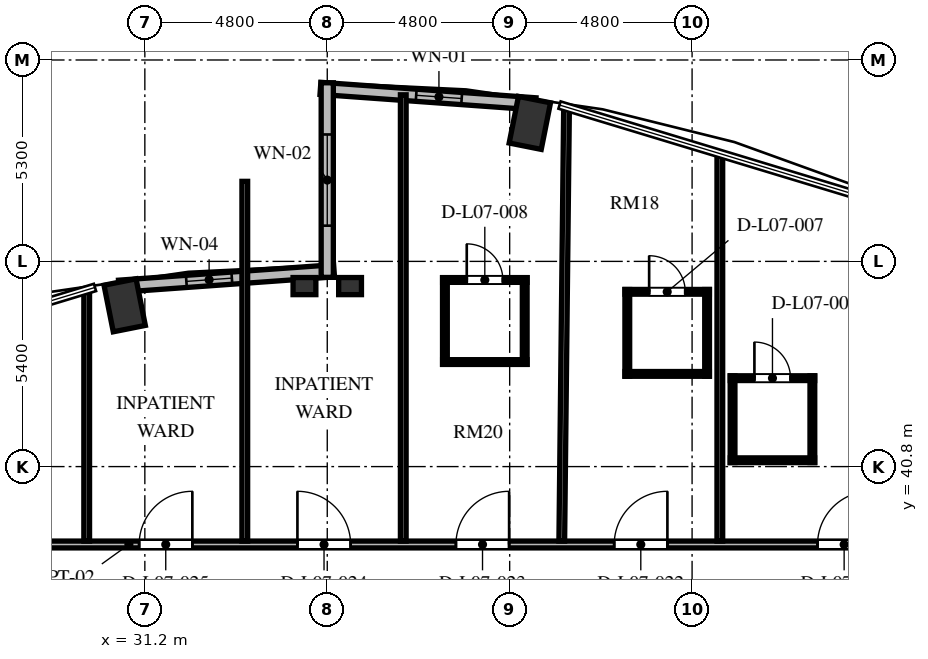
"""IFC4 building model, lengths in metres.
Left out: names, types, materials, properties, quantities, classifications, styles, units other than length and angle.
Written with IfcOpenShell. Run it as: python <this file> out.ifc"""

import sys

from ifc_helpers import new_model, si_unit, direction, frame, frame_2d, origin, origin_2d, place, context, subcontext, project, spatial, rectangle, extrude, element, fill, save


model = new_model("IFC4")
c1 = context("Model", 3, precision=1e-05, world=origin(), true_north=direction((0.0, 1.0)))
c2 = subcontext(c1, "Body", "Model", "MODEL_VIEW")
j1 = project(units=[si_unit("LENGTHUNIT", "METRE"), si_unit("PLANEANGLEUNIT", "RADIAN")], contexts=[c1])
p1 = place(None, origin())
s1 = spatial("IfcSite", under=j1, at=p1, CompositionType="ELEMENT")
p2 = place(p1, origin())
s2 = spatial("IfcBuilding", under=s1, at=p2, CompositionType="ELEMENT")
p3 = place(p2, frame((0.0, 0.0, 32.496)))
s3 = spatial("IfcBuildingStorey", under=s2, at=p3, CompositionType="ELEMENT", Elevation=32.496)
for number, where, z_axis, x_axis in (
    (1, (41.331, 49.844, 0.0), (0.0, 0.0, 1.0), (0.195, 0.981, 0.0)),
    (2, (30.669, 45.044, 0.0), (0.0, 0.0, 1.0), (-0.195, 0.981, 0.0)),
):
    element("IfcColumn", number, at=place(p3, frame(where, z_axis=z_axis, x_axis=x_axis)), inside=s3, PredefinedType="COLUMN", context=c2, shape_type="SweptSolid", body=[
        extrude(rectangle(XDim=1.25, YDim=0.86, at=origin_2d()), origin(), (0.0, 0.0, 1.0), 3.648),
    ])
for number, where, z_axis, x_axis in (
    (3, (35.4, 45.55, 0.0), (0.0, 0.0, 1.0), (1.0, 0.0, 0.0)),
    (4, (36.6, 45.55, 0.0), (0.0, 0.0, 1.0), (1.0, 0.0, 0.0)),
):
    element("IfcColumn", number, at=place(p3, frame(where, z_axis=z_axis, x_axis=x_axis)), inside=s3, PredefinedType="PILASTER", context=c2, shape_type="SweptSolid", body=[
        extrude(rectangle(XDim=0.6, YDim=0.45, at=origin_2d()), origin(), (0.0, 0.0, 1.0), 3.648),
    ])
p4 = place(p3, frame((41.481, 50.346, 0.0), z_axis=(0.0, 0.0, 1.0), x_axis=(-0.997422321809, 0.071754525696, 0.0)))
e5 = element("IfcWall", 5, at=p4, inside=s3, PredefinedType="SOLIDWALL", context=c2, shape_type="SweptSolid", body=[
    extrude(rectangle(XDim=5.675, YDim=0.32, at=frame_2d((2.838, 0.0))), origin(), (0.0, 0.0, 1.0), 3.428),
])
p5 = place(p4, frame((1.949, 0.0, 0.85)))
e6 = element("IfcOpeningElement", 6, at=p5, cuts=e5, PredefinedType="OPENING", context=c2, shape_type="SweptSolid", body=[
    extrude(rectangle(XDim=1.2, YDim=2.2, at=frame_2d((0.6, 1.1))), frame((0.0, 0.17, 0.0), z_axis=(0.0, -1.0, 0.0), x_axis=(1.0, 0.0, 0.0)), (0.0, 0.0, 1.0), 0.34),
])
p6 = place(p3, frame((36.179, 45.953, 0.0), z_axis=(0.0, 0.0, 1.0), x_axis=(-0.997421878774, -0.071760683825, 0.0)))
e7 = element("IfcWall", 7, at=p6, inside=s3, PredefinedType="SOLIDWALL", context=c2, shape_type="SweptSolid", body=[
    extrude(rectangle(XDim=5.675, YDim=0.32, at=frame_2d((2.837, 0.0))), origin(), (0.0, 0.0, 1.0), 3.428),
])
p7 = place(p6, frame((2.696, 0.0, 0.85)))
e8 = element("IfcOpeningElement", 8, at=p7, cuts=e7, PredefinedType="OPENING", context=c2, shape_type="SweptSolid", body=[
    extrude(rectangle(XDim=1.2, YDim=1.8, at=frame_2d((0.6, 0.9))), frame((0.0, 0.17, 0.0), z_axis=(0.0, -1.0, 0.0), x_axis=(1.0, 0.0, 0.0)), (0.0, 0.0, 1.0), 0.34),
])
p8 = place(p3, frame((36.0, 50.9, 0.0), z_axis=(0.0, 0.0, 1.0), x_axis=(0.0, -1.0, 0.0)))
e9 = element("IfcWall", 9, at=p8, inside=s3, PredefinedType="SOLIDWALL", context=c2, shape_type="SweptSolid", body=[
    extrude(rectangle(XDim=5.12, YDim=0.32, at=frame_2d((2.56, 0.0))), origin(), (0.0, 0.0, 1.0), 3.428),
])
p9 = place(p8, frame((1.36, 0.0, 0.84)))
e10 = element("IfcOpeningElement", 10, at=p9, cuts=e9, PredefinedType="OPENING", context=c2, shape_type="SweptSolid", body=[
    extrude(rectangle(XDim=2.4, YDim=2.04, at=frame_2d((1.2, 1.02))), frame((0.0, 0.17, 0.0), z_axis=(0.0, -1.0, 0.0), x_axis=(1.0, 0.0, 0.0)), (0.0, 0.0, 1.0), 0.34),
])
p10 = place(p3, frame((23.31, 38.75, 0.0), z_axis=(0.0, 0.0, 1.0), x_axis=(1.0, 0.0, 0.0)))
e11 = element("IfcWall", 11, at=p10, inside=s3, PredefinedType="PARTITIONING", context=c2, shape_type="SweptSolid", body=[
    extrude(rectangle(XDim=29.88, YDim=0.18, at=frame_2d((14.94, 0.0))), origin(), (0.0, 0.0, 1.0), 3.053),
])
p11 = place(p10, frame((25.591, 0.0, 0.0)))
e12 = element("IfcOpeningElement", 12, at=p11, cuts=e11, PredefinedType="OPENING", context=c2, shape_type="SweptSolid", body=[
    extrude(rectangle(XDim=1.4, YDim=2.2, at=frame_2d((0.7, 1.1))), frame((0.0, 0.1, 0.0), z_axis=(0.0, -1.0, 0.0), x_axis=(1.0, 0.0, 0.0)), (0.0, 0.0, 1.0), 0.2),
])
p12 = place(p10, frame((20.24, 0.0, 0.0)))
e13 = element("IfcOpeningElement", 13, at=p12, cuts=e11, PredefinedType="OPENING", context=c2, shape_type="SweptSolid", body=[
    extrude(rectangle(XDim=1.4, YDim=2.2, at=frame_2d((0.7, 1.1))), frame((0.0, 0.1, 0.0), z_axis=(0.0, -1.0, 0.0), x_axis=(1.0, 0.0, 0.0)), (0.0, 0.0, 1.0), 0.2),
])
p13 = place(p10, frame((16.075, 0.0, 0.0)))
e14 = element("IfcOpeningElement", 14, at=p13, cuts=e11, PredefinedType="OPENING", context=c2, shape_type="SweptSolid", body=[
    extrude(rectangle(XDim=1.4, YDim=2.2, at=frame_2d((0.7, 1.1))), frame((0.0, 0.1, 0.0), z_axis=(0.0, -1.0, 0.0), x_axis=(1.0, 0.0, 0.0)), (0.0, 0.0, 1.0), 0.2),
])
p14 = place(p10, frame((11.905, 0.0, 0.0)))
e15 = element("IfcOpeningElement", 15, at=p14, cuts=e11, PredefinedType="OPENING", context=c2, shape_type="SweptSolid", body=[
    extrude(rectangle(XDim=1.4, YDim=2.2, at=frame_2d((0.7, 1.1))), frame((0.0, 0.1, 0.0), z_axis=(0.0, -1.0, 0.0), x_axis=(1.0, 0.0, 0.0)), (0.0, 0.0, 1.0), 0.2),
])
p15 = place(p10, frame((7.74, 0.0, 0.0)))
e16 = element("IfcOpeningElement", 16, at=p15, cuts=e11, PredefinedType="OPENING", context=c2, shape_type="SweptSolid", body=[
    extrude(rectangle(XDim=1.4, YDim=2.2, at=frame_2d((0.7, 1.1))), frame((0.0, 0.1, 0.0), z_axis=(0.0, -1.0, 0.0), x_axis=(1.0, 0.0, 0.0)), (0.0, 0.0, 1.0), 0.2),
])
p16 = place(p10, frame((2.639, 0.0, 0.0)))
e17 = element("IfcOpeningElement", 17, at=p16, cuts=e11, PredefinedType="OPENING", context=c2, shape_type="SweptSolid", body=[
    extrude(rectangle(XDim=1.4, YDim=2.2, at=frame_2d((0.7, 1.1))), frame((0.0, 0.1, 0.0), z_axis=(0.0, -1.0, 0.0), x_axis=(1.0, 0.0, 0.0)), (0.0, 0.0, 1.0), 0.2),
])
p17 = place(p3, frame((29.67, 38.84, 0.0), z_axis=(0.0, 0.0, 1.0), x_axis=(0.0, 1.0, 0.0)))
e18 = element("IfcWall", 18, at=p17, inside=s3, PredefinedType="PARTITIONING", context=c2, shape_type="SweptSolid", body=[
    extrude(rectangle(XDim=6.596, YDim=0.15, at=frame_2d((3.298, 0.0))), origin(), (0.0, 0.0, 1.0), 3.428),
])
p18 = place(p3, frame((33.83, 38.84, 0.0), z_axis=(0.0, 0.0, 1.0), x_axis=(0.0, 1.0, 0.0)))
e19 = element("IfcWall", 19, at=p18, inside=s3, PredefinedType="PARTITIONING", context=c2, shape_type="SweptSolid", body=[
    extrude(rectangle(XDim=9.466, YDim=0.15, at=frame_2d((4.733, 0.0))), origin(), (0.0, 0.0, 1.0), 3.428),
])
p19 = place(p3, frame((38.0, 38.84, 0.0), z_axis=(0.0, 0.0, 1.0), x_axis=(0.0, 1.0, 0.0)))
e20 = element("IfcWall", 20, at=p19, inside=s3, PredefinedType="PARTITIONING", context=c2, shape_type="SweptSolid", body=[
    extrude(rectangle(XDim=11.743, YDim=0.15, at=frame_2d((5.872, 0.0))), origin(), (0.0, 0.0, 1.0), 3.428),
])
p20 = place(p3, frame((42.171, 38.84, 0.0), z_axis=(0.0, 0.0, 1.0), x_axis=(0.010986468696, 0.999939646932, 0.0)))
e21 = element("IfcWall", 21, at=p20, inside=s3, PredefinedType="PARTITIONING", context=c2, shape_type="SweptSolid", body=[
    extrude(rectangle(XDim=11.422, YDim=0.15, at=frame_2d((5.711, 0.0))), origin(), (0.0, 0.0, 1.0), 3.428),
])
p21 = place(p3, frame((46.33, 38.84, 0.0), z_axis=(0.0, 0.0, 1.0), x_axis=(0.0, 1.0, 0.0)))
e22 = element("IfcWall", 22, at=p21, inside=s3, PredefinedType="PARTITIONING", context=c2, shape_type="SweptSolid", body=[
    extrude(rectangle(XDim=10.185, YDim=0.15, at=frame_2d((5.092, 0.0))), origin(), (0.0, 0.0, 1.0), 3.428),
])
p22 = place(p3, frame((46.605, 43.127, 0.0), z_axis=(0.0, 0.0, 1.0), x_axis=(1.0, 0.0, 0.0)))
e23 = element("IfcWall", 23, at=p22, inside=s3, PredefinedType="PARTITIONING", context=c2, shape_type="SweptSolid", body=[
    extrude(rectangle(XDim=2.22, YDim=0.125, at=frame_2d((1.11, 0.0))), origin(), (0.0, 0.0, 1.0), 3.428),
])
p23 = place(p22, frame((0.635, 0.0, 0.0)))
e24 = element("IfcOpeningElement", 24, at=p23, cuts=e23, PredefinedType="OPENING", context=c2, shape_type="SweptSolid", body=[
    extrude(rectangle(XDim=0.95, YDim=2.1, at=frame_2d((0.475, 1.05))), frame((0.0, 0.073, 0.0), z_axis=(0.0, -1.0, 0.0), x_axis=(1.0, 0.0, 0.0)), (0.0, 0.0, 1.0), 0.145),
])
p24 = place(p3, frame((46.605, 40.967, 0.0), z_axis=(0.0, 0.0, 1.0), x_axis=(1.0, 0.0, 0.0)))
e25 = element("IfcWall", 25, at=p24, inside=s3, PredefinedType="PARTITIONING", context=c2, shape_type="SweptSolid", body=[
    extrude(rectangle(XDim=2.22, YDim=0.125, at=frame_2d((1.11, 0.0))), origin(), (0.0, 0.0, 1.0), 3.428),
])
for number, where, z_axis, x_axis in (
    (26, (48.765, 40.907, 0.0), (0.0, 0.0, 1.0), (0.0, 1.0, 0.0)),
    (27, (46.665, 40.907, 0.0), (0.0, 0.0, 1.0), (0.0, 1.0, 0.0)),
):
    element("IfcWall", number, at=place(p3, frame(where, z_axis=z_axis, x_axis=x_axis)), inside=s3, PredefinedType="PARTITIONING", context=c2, shape_type="SweptSolid", body=[
        extrude(rectangle(XDim=2.28, YDim=0.125, at=frame_2d((1.14, 0.0))), origin(), (0.0, 0.0, 1.0), 3.428),
    ])
p25 = place(p3, frame((43.835, 45.399, 0.0), z_axis=(0.0, 0.0, 1.0), x_axis=(1.0, 0.0, 0.0)))
e28 = element("IfcWall", 28, at=p25, inside=s3, PredefinedType="PARTITIONING", context=c2, shape_type="SweptSolid", body=[
    extrude(rectangle(XDim=2.22, YDim=0.125, at=frame_2d((1.11, 0.0))), origin(), (0.0, 0.0, 1.0), 3.013),
])
p26 = place(p25, frame((0.635, 0.0, 0.0)))
e29 = element("IfcOpeningElement", 29, at=p26, cuts=e28, PredefinedType="OPENING", context=c2, shape_type="SweptSolid", body=[
    extrude(rectangle(XDim=0.95, YDim=2.1, at=frame_2d((0.475, 1.05))), frame((0.0, 0.073, 0.0), z_axis=(0.0, -1.0, 0.0), x_axis=(1.0, 0.0, 0.0)), (0.0, 0.0, 1.0), 0.145),
])
p27 = place(p3, frame((43.835, 43.239, 0.0), z_axis=(0.0, 0.0, 1.0), x_axis=(1.0, 0.0, 0.0)))
e30 = element("IfcWall", 30, at=p27, inside=s3, PredefinedType="PARTITIONING", context=c2, shape_type="SweptSolid", body=[
    extrude(rectangle(XDim=2.22, YDim=0.125, at=frame_2d((1.11, 0.0))), origin(), (0.0, 0.0, 1.0), 3.053),
])
for number, where, z_axis, x_axis in (
    (31, (45.995, 43.179, 0.0), (0.0, 0.0, 1.0), (0.0, 1.0, 0.0)),
    (32, (43.895, 43.179, 0.0), (0.0, 0.0, 1.0), (0.0, 1.0, 0.0)),
):
    element("IfcWall", number, at=place(p3, frame(where, z_axis=z_axis, x_axis=x_axis)), inside=s3, PredefinedType="PARTITIONING", context=c2, shape_type="SweptSolid", body=[
        extrude(rectangle(XDim=2.28, YDim=0.125, at=frame_2d((1.14, 0.0))), origin(), (0.0, 0.0, 1.0), 3.428),
    ])
p28 = place(p3, frame((39.036, 45.711, 0.0), z_axis=(0.0, 0.0, 1.0), x_axis=(1.0, 0.0, 0.0)))
e33 = element("IfcWall", 33, at=p28, inside=s3, PredefinedType="PARTITIONING", context=c2, shape_type="SweptSolid", body=[
    extrude(rectangle(XDim=2.22, YDim=0.125, at=frame_2d((1.11, 0.0))), origin(), (0.0, 0.0, 1.0), 3.428),
])
p29 = place(p28, frame((0.635, 0.0, 0.0)))
e34 = element("IfcOpeningElement", 34, at=p29, cuts=e33, PredefinedType="OPENING", context=c2, shape_type="SweptSolid", body=[
    extrude(rectangle(XDim=0.95, YDim=2.1, at=frame_2d((0.475, 1.05))), frame((0.0, 0.073, 0.0), z_axis=(0.0, -1.0, 0.0), x_axis=(1.0, 0.0, 0.0)), (0.0, 0.0, 1.0), 0.145),
])
p30 = place(p3, frame((39.036, 43.551, 0.0), z_axis=(0.0, 0.0, 1.0), x_axis=(1.0, 0.0, 0.0)))
e35 = element("IfcWall", 35, at=p30, inside=s3, PredefinedType="PARTITIONING", context=c2, shape_type="SweptSolid", body=[
    extrude(rectangle(XDim=2.22, YDim=0.125, at=frame_2d((1.11, 0.0))), origin(), (0.0, 0.0, 1.0), 3.428),
])
for number, where, z_axis, x_axis in (
    (36, (41.196, 43.491, 0.0), (0.0, 0.0, 1.0), (0.0, 1.0, 0.0)),
    (37, (39.096, 43.491, 0.0), (0.0, 0.0, 1.0), (0.0, 1.0, 0.0)),
):
    element("IfcWall", number, at=place(p3, frame(where, z_axis=z_axis, x_axis=x_axis)), inside=s3, PredefinedType="PARTITIONING", context=c2, shape_type="SweptSolid", body=[
        extrude(rectangle(XDim=2.28, YDim=0.125, at=frame_2d((1.14, 0.0))), origin(), (0.0, 0.0, 1.0), 3.428),
    ])
p31 = place(p5, origin())
e38 = element("IfcWindow", 38, at=p31, inside=s3, PartitioningType="SINGLE_PANEL", PredefinedType="WINDOW", context=c2, shape_type="SweptSolid", body=[
    extrude(rectangle(XDim=1.2, YDim=2.2, at=frame_2d((0.6, 1.1))), frame((0.0, 0.03, 0.0), z_axis=(0.0, -1.0, 0.0), x_axis=(1.0, 0.0, 0.0)), (0.0, 0.0, 1.0), 0.06),
])
fill(e6, e38)
p32 = place(p7, origin())
e39 = element("IfcWindow", 39, at=p32, inside=s3, PartitioningType="SINGLE_PANEL", PredefinedType="WINDOW", context=c2, shape_type="SweptSolid", body=[
    extrude(rectangle(XDim=1.2, YDim=1.8, at=frame_2d((0.6, 0.9))), frame((0.0, 0.03, 0.0), z_axis=(0.0, -1.0, 0.0), x_axis=(1.0, 0.0, 0.0)), (0.0, 0.0, 1.0), 0.06),
])
fill(e8, e39)
p33 = place(p9, origin())
e40 = element("IfcWindow", 40, at=p33, inside=s3, PartitioningType="SINGLE_PANEL", PredefinedType="WINDOW", context=c2, shape_type="SweptSolid", body=[
    extrude(rectangle(XDim=2.4, YDim=2.04, at=frame_2d((1.2, 1.02))), frame((0.0, 0.03, 0.0), z_axis=(0.0, -1.0, 0.0), x_axis=(1.0, 0.0, 0.0)), (0.0, 0.0, 1.0), 0.06),
])
fill(e10, e40)
p34 = place(p23, origin())
e41 = element("IfcDoor", 41, at=p34, inside=s3, OperationType="SINGLE_SWING_LEFT", PredefinedType="DOOR", context=c2, shape_type="SweptSolid", body=[
    extrude(rectangle(XDim=0.95, YDim=2.1, at=frame_2d((0.475, 1.05))), frame((0.0, 0.025, 0.0), z_axis=(0.0, -1.0, 0.0), x_axis=(1.0, 0.0, 0.0)), (0.0, 0.0, 1.0), 0.05),
])
fill(e24, e41)
p35 = place(p11, origin())
e42 = element("IfcDoor", 42, at=p35, inside=s3, OperationType="SINGLE_SWING_RIGHT", PredefinedType="DOOR", context=c2, shape_type="SweptSolid", body=[
    extrude(rectangle(XDim=1.4, YDim=2.2, at=frame_2d((0.7, 1.1))), frame((0.0, 0.025, 0.0), z_axis=(0.0, -1.0, 0.0), x_axis=(1.0, 0.0, 0.0)), (0.0, 0.0, 1.0), 0.05),
])
fill(e12, e42)
p36 = place(p26, origin())
e43 = element("IfcDoor", 43, at=p36, inside=s3, OperationType="SINGLE_SWING_LEFT", PredefinedType="DOOR", context=c2, shape_type="SweptSolid", body=[
    extrude(rectangle(XDim=0.95, YDim=2.1, at=frame_2d((0.475, 1.05))), frame((0.0, 0.025, 0.0), z_axis=(0.0, -1.0, 0.0), x_axis=(1.0, 0.0, 0.0)), (0.0, 0.0, 1.0), 0.05),
])
fill(e29, e43)
p37 = place(p12, origin())
e44 = element("IfcDoor", 44, at=p37, inside=s3, OperationType="SINGLE_SWING_RIGHT", PredefinedType="DOOR", context=c2, shape_type="SweptSolid", body=[
    extrude(rectangle(XDim=1.4, YDim=2.2, at=frame_2d((0.7, 1.1))), frame((0.0, 0.025, 0.0), z_axis=(0.0, -1.0, 0.0), x_axis=(1.0, 0.0, 0.0)), (0.0, 0.0, 1.0), 0.05),
])
fill(e13, e44)
p38 = place(p29, origin())
e45 = element("IfcDoor", 45, at=p38, inside=s3, OperationType="SINGLE_SWING_LEFT", PredefinedType="DOOR", context=c2, shape_type="SweptSolid", body=[
    extrude(rectangle(XDim=0.95, YDim=2.1, at=frame_2d((0.475, 1.05))), frame((0.0, 0.025, 0.0), z_axis=(0.0, -1.0, 0.0), x_axis=(1.0, 0.0, 0.0)), (0.0, 0.0, 1.0), 0.05),
])
fill(e34, e45)
p39 = place(p13, origin())
e46 = element("IfcDoor", 46, at=p39, inside=s3, OperationType="SINGLE_SWING_RIGHT", PredefinedType="DOOR", context=c2, shape_type="SweptSolid", body=[
    extrude(rectangle(XDim=1.4, YDim=2.2, at=frame_2d((0.7, 1.1))), frame((0.0, 0.025, 0.0), z_axis=(0.0, -1.0, 0.0), x_axis=(1.0, 0.0, 0.0)), (0.0, 0.0, 1.0), 0.05),
])
fill(e14, e46)
p40 = place(p14, origin())
e47 = element("IfcDoor", 47, at=p40, inside=s3, OperationType="SINGLE_SWING_LEFT", PredefinedType="DOOR", context=c2, shape_type="SweptSolid", body=[
    extrude(rectangle(XDim=1.4, YDim=2.2, at=frame_2d((0.7, 1.1))), frame((0.0, 0.025, 0.0), z_axis=(0.0, -1.0, 0.0), x_axis=(1.0, 0.0, 0.0)), (0.0, 0.0, 1.0), 0.05),
])
fill(e15, e47)
p41 = place(p15, origin())
e48 = element("IfcDoor", 48, at=p41, inside=s3, OperationType="SINGLE_SWING_RIGHT", PredefinedType="DOOR", context=c2, shape_type="SweptSolid", body=[
    extrude(rectangle(XDim=1.4, YDim=2.2, at=frame_2d((0.7, 1.1))), frame((0.0, 0.025, 0.0), z_axis=(0.0, -1.0, 0.0), x_axis=(1.0, 0.0, 0.0)), (0.0, 0.0, 1.0), 0.05),
])
fill(e16, e48)
save(model, sys.argv[1])
